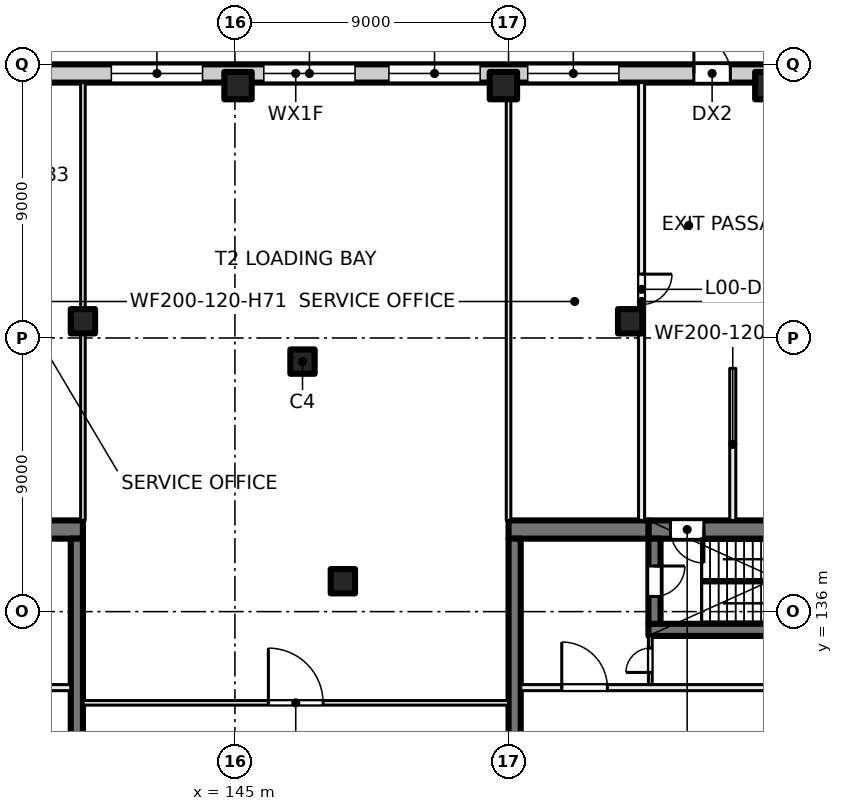
"""IFC4 building model, lengths in metres.
Left out: names, types, materials, properties, quantities, classifications, styles, units other than length and angle.
Written with IfcOpenShell. Run it as: python <this file> out.ifc"""

import sys

from ifc_helpers import new_model, si_unit, direction, frame, frame_2d, origin, origin_2d, place, context, subcontext, project, spatial, rectangle, extrude, element, fill, save


model = new_model("IFC4")
c1 = context("Model", 3, precision=1e-05, world=origin(), true_north=direction((0.0, 1.0)))
c2 = subcontext(c1, "Body", "Model", "MODEL_VIEW")
j1 = project(units=[si_unit("LENGTHUNIT", "METRE"), si_unit("PLANEANGLEUNIT", "RADIAN")], contexts=[c1])
p1 = place(None, origin())
s1 = spatial("IfcSite", under=j1, at=p1, CompositionType="ELEMENT")
p2 = place(p1, origin())
s2 = spatial("IfcBuilding", under=s1, at=p2, CompositionType="ELEMENT")
p3 = place(p2, origin())
s3 = spatial("IfcBuildingStorey", under=s2, at=p3, CompositionType="ELEMENT", Elevation=0.0)
for number, where, z_axis, x_axis in (
    (1, (145.102, 153.3, 0.0), (0.0, 0.0, 1.0), (1.0, 0.0, 0.0)),
    (2, (153.831, 153.3, 0.0), (0.0, 0.0, 1.0), (1.0, 0.0, 0.0)),
    (3, (162.561, 153.3, 0.0), (0.0, 0.0, 1.0), (1.0, 0.0, 0.0)),
):
    element("IfcColumn", number, at=place(p3, frame(where, z_axis=z_axis, x_axis=x_axis)), inside=s3, PredefinedType="COLUMN", context=c2, shape_type="SweptSolid", body=[
        extrude(rectangle(XDim=0.9, YDim=0.9, at=origin_2d()), origin(), (0.0, 0.0, 1.0), 7.5),
    ])
for number, where, z_axis, x_axis in (
    (4, (148.55, 137.0, 0.0), (0.0, 0.0, 1.0), (1.0, 0.0, 0.0)),
    (5, (140.0, 145.55, 0.0), (0.0, 0.0, 1.0), (1.0, 0.0, 0.0)),
    (6, (147.223, 144.223, 0.0), (0.0, 0.0, 1.0), (1.0, 0.0, 0.0)),
    (7, (158.0, 145.55, 0.0), (0.0, 0.0, 1.0), (1.0, 0.0, 0.0)),
):
    element("IfcColumn", number, at=place(p3, frame(where, z_axis=z_axis, x_axis=x_axis)), inside=s3, PredefinedType="COLUMN", context=c2, shape_type="SweptSolid", body=[
        extrude(rectangle(XDim=0.8, YDim=0.8, at=origin_2d()), origin(), (0.0, 0.0, 1.0), 7.5),
    ])
p4 = place(p3, frame((135.4, 138.7, 0.0), z_axis=(0.0, 0.0, 1.0), x_axis=(1.0, 0.0, 0.0)))
e8 = element("IfcWall", 8, at=p4, inside=s3, PredefinedType="SHEAR", context=c2, shape_type="SweptSolid", body=[
    extrude(rectangle(XDim=4.6, YDim=0.6, at=frame_2d((2.3, 0.0))), origin(), (0.0, 0.0, 1.0), 7.5),
])
p5 = place(p3, frame((139.8, 129.8, 0.0), z_axis=(0.0, 0.0, 1.0), x_axis=(0.0, 1.0, 0.0)))
e9 = element("IfcWall", 9, at=p5, inside=s3, PredefinedType="SHEAR", context=c2, shape_type="SweptSolid", body=[
    extrude(rectangle(XDim=8.6, YDim=0.4, at=frame_2d((4.3, 0.0))), origin(), (0.0, 0.0, 1.0), 7.5),
])
p6 = place(p3, frame((166.4, 138.7, 0.0), z_axis=(0.0, 0.0, 1.0), x_axis=(-1.0, 0.0, 0.0)))
e10 = element("IfcWall", 10, at=p6, inside=s3, PredefinedType="SHEAR", context=c2, shape_type="SweptSolid", body=[
    extrude(rectangle(XDim=7.8, YDim=0.6, at=frame_2d((3.9, 0.0))), origin(), (0.0, 0.0, 1.0), 7.5),
])
p7 = place(p6, frame((5.975, 0.0, 0.0)))
e11 = element("IfcOpeningElement", 11, at=p7, cuts=e10, PredefinedType="OPENING", context=c2, shape_type="SweptSolid", body=[
    extrude(rectangle(XDim=1.1, YDim=2.1, at=frame_2d((0.55, 1.05))), frame((0.0, 0.31, 0.0), z_axis=(0.0, -1.0, 0.0), x_axis=(1.0, 0.0, 0.0)), (0.0, 0.0, 1.0), 0.62),
])
p8 = place(p3, frame((158.6, 138.7, 0.0), z_axis=(0.0, 0.0, 1.0), x_axis=(-1.0, 0.0, 0.0)))
e12 = element("IfcWall", 12, at=p8, inside=s3, PredefinedType="SHEAR", context=c2, shape_type="SweptSolid", body=[
    extrude(rectangle(XDim=4.6, YDim=0.6, at=frame_2d((2.3, 0.0))), origin(), (0.0, 0.0, 1.0), 7.5),
])
p9 = place(p3, frame((166.4, 135.4, 0.0), z_axis=(0.0, 0.0, 1.0), x_axis=(-1.0, 0.0, 0.0)))
e13 = element("IfcWall", 13, at=p9, inside=s3, PredefinedType="SHEAR", context=c2, shape_type="SweptSolid", body=[
    extrude(rectangle(XDim=7.8, YDim=0.4, at=frame_2d((3.9, 0.0))), origin(), (0.0, 0.0, 1.0), 7.5),
])
p10 = place(p3, frame((158.8, 138.4, 0.0), z_axis=(0.0, 0.0, 1.0), x_axis=(0.0, -1.0, 0.0)))
e14 = element("IfcWall", 14, at=p10, inside=s3, PredefinedType="SHEAR", context=c2, shape_type="SweptSolid", body=[
    extrude(rectangle(XDim=2.8, YDim=0.4, at=frame_2d((1.4, 0.0))), origin(), (0.0, 0.0, 1.0), 7.5),
])
p11 = place(p10, frame((0.9, 0.0, 0.0)))
e15 = element("IfcOpeningElement", 15, at=p11, cuts=e14, PredefinedType="OPENING", context=c2, shape_type="SweptSolid", body=[
    extrude(rectangle(XDim=1.0, YDim=2.1, at=frame_2d((0.5, 1.05))), frame((0.0, 0.21, 0.0), z_axis=(0.0, -1.0, 0.0), x_axis=(1.0, 0.0, 0.0)), (0.0, 0.0, 1.0), 0.42),
])
p12 = place(p3, frame((154.2, 138.4, 0.0), z_axis=(0.0, 0.0, 1.0), x_axis=(0.0, -1.0, 0.0)))
e16 = element("IfcWall", 16, at=p12, inside=s3, PredefinedType="SHEAR", context=c2, shape_type="SweptSolid", body=[
    extrude(rectangle(XDim=8.6, YDim=0.4, at=frame_2d((4.3, 0.0))), origin(), (0.0, 0.0, 1.0), 7.5),
])
p13 = place(p3, frame((131.022, 153.7, 0.0), z_axis=(0.0, 0.0, 1.0), x_axis=(1.0, 0.0, 0.0)))
e17 = element("IfcWall", 17, at=p13, inside=s3, PredefinedType="SOLIDWALL", context=c2, shape_type="SweptSolid", body=[
    extrude(rectangle(XDim=31.957, YDim=0.6, at=frame_2d((15.978, 0.0))), origin(), (0.0, 0.0, 1.0), 7.1),
])
p14 = place(p13, frame((1.683, 0.0, 0.0)))
e18 = element("IfcOpeningElement", 18, at=p14, cuts=e17, PredefinedType="OPENING", context=c2, shape_type="SweptSolid", body=[
    extrude(rectangle(XDim=1.2, YDim=2.4, at=frame_2d((0.6, 1.2))), frame((0.0, 0.31, 0.0), z_axis=(0.0, -1.0, 0.0), x_axis=(1.0, 0.0, 0.0)), (0.0, 0.0, 1.0), 0.62),
])
p15 = place(p13, frame((9.913, 0.0, 0.9)))
e19 = element("IfcOpeningElement", 19, at=p15, cuts=e17, PredefinedType="OPENING", context=c2, shape_type="SweptSolid", body=[
    extrude(rectangle(XDim=3.0, YDim=4.2, at=frame_2d((1.5, 2.1))), frame((0.0, 0.31, 0.0), z_axis=(0.0, -1.0, 0.0), x_axis=(1.0, 0.0, 0.0)), (0.0, 0.0, 1.0), 0.62),
])
p16 = place(p13, frame((14.928, 0.0, 0.9)))
e20 = element("IfcOpeningElement", 20, at=p16, cuts=e17, PredefinedType="OPENING", context=c2, shape_type="SweptSolid", body=[
    extrude(rectangle(XDim=3.0, YDim=4.2, at=frame_2d((1.5, 2.1))), frame((0.0, 0.31, 0.0), z_axis=(0.0, -1.0, 0.0), x_axis=(1.0, 0.0, 0.0)), (0.0, 0.0, 1.0), 0.62),
])
p17 = place(p13, frame((19.043, 0.0, 0.9)))
e21 = element("IfcOpeningElement", 21, at=p17, cuts=e17, PredefinedType="OPENING", context=c2, shape_type="SweptSolid", body=[
    extrude(rectangle(XDim=3.0, YDim=4.2, at=frame_2d((1.5, 2.1))), frame((0.0, 0.31, 0.0), z_axis=(0.0, -1.0, 0.0), x_axis=(1.0, 0.0, 0.0)), (0.0, 0.0, 1.0), 0.62),
])
p18 = place(p13, frame((23.609, 0.0, 0.9)))
e22 = element("IfcOpeningElement", 22, at=p18, cuts=e17, PredefinedType="OPENING", context=c2, shape_type="SweptSolid", body=[
    extrude(rectangle(XDim=3.0, YDim=4.2, at=frame_2d((1.5, 2.1))), frame((0.0, 0.31, 0.0), z_axis=(0.0, -1.0, 0.0), x_axis=(1.0, 0.0, 0.0)), (0.0, 0.0, 1.0), 0.62),
])
p19 = place(p13, frame((29.074, 0.0, 0.0)))
e23 = element("IfcOpeningElement", 23, at=p19, cuts=e17, PredefinedType="OPENING", context=c2, shape_type="SweptSolid", body=[
    extrude(rectangle(XDim=1.2, YDim=2.4, at=frame_2d((0.6, 1.2))), frame((0.0, 0.31, 0.0), z_axis=(0.0, -1.0, 0.0), x_axis=(1.0, 0.0, 0.0)), (0.0, 0.0, 1.0), 0.62),
])
p20 = place(p3, frame((135.0, 133.5, 0.0), z_axis=(0.0, 0.0, 1.0), x_axis=(1.0, 0.0, 0.0)))
e24 = element("IfcWall", 24, at=p20, inside=s3, PredefinedType="PARTITIONING", context=c2, shape_type="SweptSolid", body=[
    extrude(rectangle(XDim=4.6, YDim=0.2, at=frame_2d((2.3, 0.0))), origin(), (0.0, 0.0, 1.0), 7.1),
])
p21 = place(p20, frame((1.75, 0.0, 0.0)))
e25 = element("IfcOpeningElement", 25, at=p21, cuts=e24, PredefinedType="OPENING", context=c2, shape_type="SweptSolid", body=[
    extrude(rectangle(XDim=1.5, YDim=2.1, at=frame_2d((0.75, 1.05))), frame((0.0, 0.11, 0.0), z_axis=(0.0, -1.0, 0.0), x_axis=(1.0, 0.0, 0.0)), (0.0, 0.0, 1.0), 0.22),
])
p22 = place(p3, frame((154.4, 133.5, 0.0), z_axis=(0.0, 0.0, 1.0), x_axis=(1.0, 0.0, 0.0)))
e26 = element("IfcWall", 26, at=p22, inside=s3, PredefinedType="PARTITIONING", context=c2, shape_type="SweptSolid", body=[
    extrude(rectangle(XDim=9.4, YDim=0.2, at=frame_2d((4.7, 0.0))), origin(), (0.0, 0.0, 1.0), 7.1),
])
p23 = place(p22, frame((1.35, 0.0, 0.0)))
e27 = element("IfcOpeningElement", 27, at=p23, cuts=e26, PredefinedType="OPENING", context=c2, shape_type="SweptSolid", body=[
    extrude(rectangle(XDim=1.5, YDim=2.1, at=frame_2d((0.75, 1.05))), frame((0.0, 0.11, 0.0), z_axis=(0.0, -1.0, 0.0), x_axis=(1.0, 0.0, 0.0)), (0.0, 0.0, 1.0), 0.22),
])
p24 = place(p3, frame((158.663, 133.6, 0.0), z_axis=(0.0, 0.0, 1.0), x_axis=(0.0, 1.0, 0.0)))
e28 = element("IfcWall", 28, at=p24, inside=s3, PredefinedType="PARTITIONING", context=c2, shape_type="SweptSolid", body=[
    extrude(rectangle(XDim=1.6, YDim=0.125, at=frame_2d((0.8, 0.0))), origin(), (0.0, 0.0, 1.0), 7.1),
])
p25 = place(p24, frame((0.4, 0.0, 0.0)))
e29 = element("IfcOpeningElement", 29, at=p25, cuts=e28, PredefinedType="OPENING", context=c2, shape_type="SweptSolid", body=[
    extrude(rectangle(XDim=0.8, YDim=2.1, at=frame_2d((0.4, 1.05))), frame((0.0, 0.073, 0.0), z_axis=(0.0, -1.0, 0.0), x_axis=(1.0, 0.0, 0.0)), (0.0, 0.0, 1.0), 0.145),
])
p26 = place(p3, frame((140.0, 133.0, 0.0), z_axis=(0.0, 0.0, 1.0), x_axis=(1.0, 0.0, 0.0)))
e30 = element("IfcWall", 30, at=p26, inside=s3, PredefinedType="PARTITIONING", context=c2, shape_type="SweptSolid", body=[
    extrude(rectangle(XDim=14.0, YDim=0.15, at=frame_2d((7.0, 0.0))), origin(), (0.0, 0.0, 1.0), 7.1),
])
p27 = place(p26, frame((6.1, 0.0, 0.0)))
e31 = element("IfcOpeningElement", 31, at=p27, cuts=e30, PredefinedType="OPENING", context=c2, shape_type="SweptSolid", body=[
    extrude(rectangle(XDim=1.8, YDim=2.1, at=frame_2d((0.9, 1.05))), frame((0.0, 0.085, 0.0), z_axis=(0.0, -1.0, 0.0), x_axis=(1.0, 0.0, 0.0)), (0.0, 0.0, 1.0), 0.17),
])
for number, where, z_axis, x_axis in (
    (32, (140.0, 139.0, 0.0), (0.0, 0.0, 1.0), (0.0, 1.0, 0.0)),
    (33, (154.0, 139.0, 0.0), (0.0, 0.0, 1.0), (0.0, 1.0, 0.0)),
):
    element("IfcWall", number, at=place(p3, frame(where, z_axis=z_axis, x_axis=x_axis)), inside=s3, PredefinedType="PARTITIONING", context=c2, shape_type="SweptSolid", body=[
        extrude(rectangle(XDim=14.4, YDim=0.15, at=frame_2d((7.2, 0.0))), origin(), (0.0, 0.0, 1.0), 7.1),
    ])
p28 = place(p3, frame((158.375, 139.0, 0.0), z_axis=(0.0, 0.0, 1.0), x_axis=(0.0, 1.0, 0.0)))
e34 = element("IfcWall", 34, at=p28, inside=s3, PredefinedType="PARTITIONING", context=c2, shape_type="SweptSolid", body=[
    extrude(rectangle(XDim=14.4, YDim=0.2, at=frame_2d((7.2, 0.0))), origin(), (0.0, 0.0, 1.0), 7.1),
])
p29 = place(p28, frame((7.1, 0.0, 0.0)))
e35 = element("IfcOpeningElement", 35, at=p29, cuts=e34, PredefinedType="OPENING", context=c2, shape_type="SweptSolid", body=[
    extrude(rectangle(XDim=1.0, YDim=2.1, at=frame_2d((0.5, 1.05))), frame((0.0, 0.11, 0.0), z_axis=(0.0, -1.0, 0.0), x_axis=(1.0, 0.0, 0.0)), (0.0, 0.0, 1.0), 0.22),
])
p30 = place(p3, frame((161.375, 139.0, 0.0), z_axis=(0.0, 0.0, 1.0), x_axis=(0.0, 1.0, 0.0)))
e36 = element("IfcWall", 36, at=p30, inside=s3, PredefinedType="PARTITIONING", context=c2, shape_type="SweptSolid", body=[
    extrude(rectangle(XDim=5.0, YDim=0.2, at=frame_2d((2.5, 0.0))), origin(), (0.0, 0.0, 1.0), 7.1),
])
p31 = place(p15, origin())
e37 = element("IfcWindow", 37, at=p31, inside=s3, PartitioningType="SINGLE_PANEL", PredefinedType="WINDOW", context=c2, shape_type="SweptSolid", body=[
    extrude(rectangle(XDim=3.0, YDim=4.2, at=frame_2d((1.5, 2.1))), frame((0.0, 0.03, 0.0), z_axis=(0.0, -1.0, 0.0), x_axis=(1.0, 0.0, 0.0)), (0.0, 0.0, 1.0), 0.06),
])
fill(e19, e37)
p32 = place(p16, origin())
e38 = element("IfcWindow", 38, at=p32, inside=s3, PartitioningType="SINGLE_PANEL", PredefinedType="WINDOW", context=c2, shape_type="SweptSolid", body=[
    extrude(rectangle(XDim=3.0, YDim=4.2, at=frame_2d((1.5, 2.1))), frame((0.0, 0.03, 0.0), z_axis=(0.0, -1.0, 0.0), x_axis=(1.0, 0.0, 0.0)), (0.0, 0.0, 1.0), 0.06),
])
fill(e20, e38)
p33 = place(p17, origin())
e39 = element("IfcWindow", 39, at=p33, inside=s3, PartitioningType="SINGLE_PANEL", PredefinedType="WINDOW", context=c2, shape_type="SweptSolid", body=[
    extrude(rectangle(XDim=3.0, YDim=4.2, at=frame_2d((1.5, 2.1))), frame((0.0, 0.03, 0.0), z_axis=(0.0, -1.0, 0.0), x_axis=(1.0, 0.0, 0.0)), (0.0, 0.0, 1.0), 0.06),
])
fill(e21, e39)
p34 = place(p18, origin())
e40 = element("IfcWindow", 40, at=p34, inside=s3, PartitioningType="SINGLE_PANEL", PredefinedType="WINDOW", context=c2, shape_type="SweptSolid", body=[
    extrude(rectangle(XDim=3.0, YDim=4.2, at=frame_2d((1.5, 2.1))), frame((0.0, 0.03, 0.0), z_axis=(0.0, -1.0, 0.0), x_axis=(1.0, 0.0, 0.0)), (0.0, 0.0, 1.0), 0.06),
])
fill(e22, e40)
p35 = place(p19, origin())
e41 = element("IfcDoor", 41, at=p35, inside=s3, OperationType="SINGLE_SWING_RIGHT", PredefinedType="DOOR", context=c2, shape_type="SweptSolid", body=[
    extrude(rectangle(XDim=1.2, YDim=2.4, at=frame_2d((0.6, 1.2))), frame((0.0, 0.025, 0.0), z_axis=(0.0, -1.0, 0.0), x_axis=(1.0, 0.0, 0.0)), (0.0, 0.0, 1.0), 0.05),
])
fill(e23, e41)
p36 = place(p23, origin())
e42 = element("IfcDoor", 42, at=p36, inside=s3, OperationType="DOUBLE_DOOR_SINGLE_SWING", PredefinedType="DOOR", context=c2, shape_type="SweptSolid", body=[
    extrude(rectangle(XDim=1.5, YDim=2.1, at=frame_2d((0.75, 1.05))), frame((0.0, 0.025, 0.0), z_axis=(0.0, -1.0, 0.0), x_axis=(1.0, 0.0, 0.0)), (0.0, 0.0, 1.0), 0.05),
])
fill(e27, e42)
p37 = place(p11, origin())
e43 = element("IfcDoor", 43, at=p37, inside=s3, OperationType="SINGLE_SWING_RIGHT", PredefinedType="DOOR", context=c2, shape_type="SweptSolid", body=[
    extrude(rectangle(XDim=1.0, YDim=2.1, at=frame_2d((0.5, 1.05))), frame((0.0, 0.025, 0.0), z_axis=(0.0, -1.0, 0.0), x_axis=(1.0, 0.0, 0.0)), (0.0, 0.0, 1.0), 0.05),
])
fill(e15, e43)
p38 = place(p25, origin())
e44 = element("IfcDoor", 44, at=p38, inside=s3, OperationType="SINGLE_SWING_LEFT", PredefinedType="DOOR", context=c2, shape_type="SweptSolid", body=[
    extrude(rectangle(XDim=0.8, YDim=2.1, at=frame_2d((0.4, 1.05))), frame((0.0, 0.025, 0.0), z_axis=(0.0, -1.0, 0.0), x_axis=(1.0, 0.0, 0.0)), (0.0, 0.0, 1.0), 0.05),
])
fill(e29, e44)
p39 = place(p7, origin())
e45 = element("IfcDoor", 45, at=p39, inside=s3, OperationType="SINGLE_SWING_LEFT", PredefinedType="DOOR", context=c2, shape_type="SweptSolid", body=[
    extrude(rectangle(XDim=1.1, YDim=2.1, at=frame_2d((0.55, 1.05))), frame((0.0, 0.025, 0.0), z_axis=(0.0, -1.0, 0.0), x_axis=(1.0, 0.0, 0.0)), (0.0, 0.0, 1.0), 0.05),
])
fill(e11, e45)
p40 = place(p27, origin())
e46 = element("IfcDoor", 46, at=p40, inside=s3, OperationType="DOUBLE_DOOR_SINGLE_SWING", PredefinedType="DOOR", context=c2, shape_type="SweptSolid", body=[
    extrude(rectangle(XDim=1.8, YDim=2.1, at=frame_2d((0.9, 1.05))), frame((0.0, 0.025, 0.0), z_axis=(0.0, -1.0, 0.0), x_axis=(1.0, 0.0, 0.0)), (0.0, 0.0, 1.0), 0.05),
])
fill(e31, e46)
p41 = place(p29, origin())
e47 = element("IfcDoor", 47, at=p41, inside=s3, OperationType="SINGLE_SWING_RIGHT", PredefinedType="DOOR", context=c2, shape_type="SweptSolid", body=[
    extrude(rectangle(XDim=1.0, YDim=2.1, at=frame_2d((0.5, 1.05))), frame((0.0, 0.025, 0.0), z_axis=(0.0, -1.0, 0.0), x_axis=(1.0, 0.0, 0.0)), (0.0, 0.0, 1.0), 0.05),
])
fill(e35, e47)
save(model, sys.argv[1])
